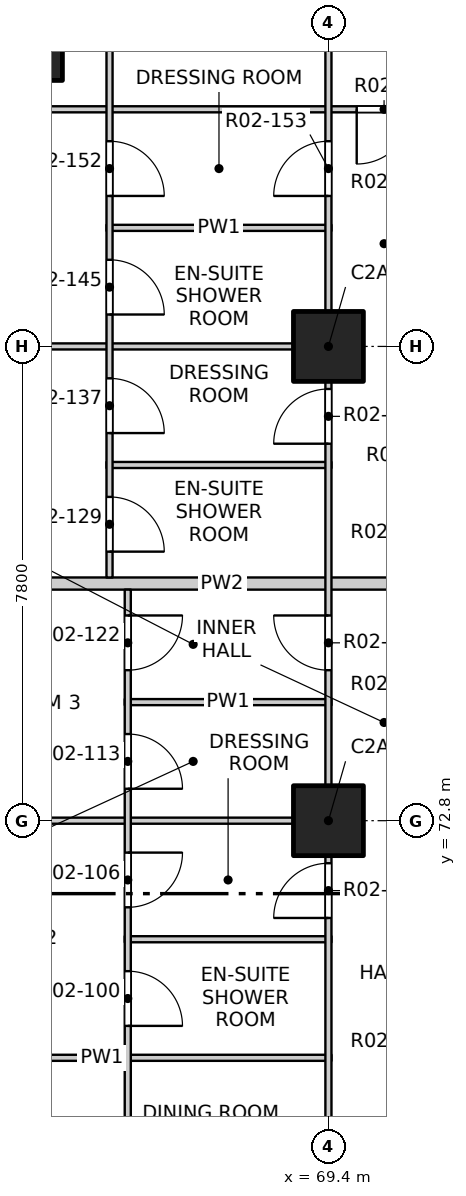
"""IFC4 building model, lengths in metres.
Left out: names, types, materials, properties, quantities, classifications, styles, units other than length and angle.
Written with IfcOpenShell. Run it as: python <this file> out.ifc"""

import sys

from ifc_helpers import new_model, si_unit, direction, frame, frame_2d, origin, origin_2d, place, context, subcontext, project, spatial, rectangle, extrude, element, fill, save


model = new_model("IFC4")
c1 = context("Model", 3, precision=1e-05, world=origin(), true_north=direction((0.0, 1.0)))
c2 = subcontext(c1, "Body", "Model", "MODEL_VIEW")
j1 = project(units=[si_unit("LENGTHUNIT", "METRE"), si_unit("PLANEANGLEUNIT", "RADIAN")], contexts=[c1])
p1 = place(None, origin())
s1 = spatial("IfcSite", under=j1, at=p1, CompositionType="ELEMENT")
p2 = place(p1, origin())
s2 = spatial("IfcBuilding", under=s1, at=p2, CompositionType="ELEMENT")
p3 = place(p2, frame((0.0, 0.0, 29.7)))
s3 = spatial("IfcBuildingStorey", under=s2, at=p3, CompositionType="ELEMENT", Elevation=29.7)
p4 = place(p3, frame((64.5, 85.5, -0.25), z_axis=(0.0, 0.0, 1.0), x_axis=(1.0, 0.0, 0.0)))
e1 = element("IfcColumn", 1, at=p4, inside=s3, PredefinedType="COLUMN", context=c2, shape_type="SweptSolid", body=[
    extrude(rectangle(XDim=1.05, YDim=1.05, at=origin_2d()), origin(), (0.0, 0.0, 1.0), 3.4),
])
for number, where, z_axis, x_axis in (
    (2, (69.4, 72.8, -0.25), (0.0, 0.0, 1.0), (1.0, 0.0, 0.0)),
    (3, (69.4, 80.6, -0.25), (0.0, 0.0, 1.0), (1.0, 0.0, 0.0)),
):
    element("IfcColumn", number, at=place(p3, frame(where, z_axis=z_axis, x_axis=x_axis)), inside=s3, PredefinedType="COLUMN", context=c2, shape_type="SweptSolid", body=[
        extrude(rectangle(XDim=1.15, YDim=1.15, at=origin_2d()), origin(), (0.0, 0.0, 1.0), 3.4),
    ])
p5 = place(p3, frame((61.9, 68.9, 0.0), z_axis=(0.0, 0.0, 1.0), x_axis=(1.0, 0.0, 0.0)))
e4 = element("IfcWall", 4, at=p5, inside=s3, PredefinedType="PARTITIONING", context=c2, shape_type="SweptSolid", body=[
    extrude(rectangle(XDim=7.55, YDim=0.1, at=frame_2d((3.775, 0.0))), origin(), (0.0, 0.0, 1.0), 3.15),
])
p6 = place(p3, frame((66.05, 70.85, 0.0), z_axis=(0.0, 0.0, 1.0), x_axis=(1.0, 0.0, 0.0)))
e5 = element("IfcWall", 5, at=p6, inside=s3, PredefinedType="PARTITIONING", context=c2, shape_type="SweptSolid", body=[
    extrude(rectangle(XDim=3.4, YDim=0.1, at=frame_2d((1.7, 0.0))), origin(), (0.0, 0.0, 1.0), 3.15),
])
p7 = place(p3, frame((61.9, 72.8, 0.0), z_axis=(0.0, 0.0, 1.0), x_axis=(1.0, 0.0, 0.0)))
e6 = element("IfcWall", 6, at=p7, inside=s3, PredefinedType="PARTITIONING", context=c2, shape_type="SweptSolid", body=[
    extrude(rectangle(XDim=7.55, YDim=0.1, at=frame_2d((3.775, 0.0))), origin(), (0.0, 0.0, 1.0), 2.55),
])
p8 = place(p3, frame((66.05, 74.75, 0.0), z_axis=(0.0, 0.0, 1.0), x_axis=(1.0, 0.0, 0.0)))
e7 = element("IfcWall", 7, at=p8, inside=s3, PredefinedType="PARTITIONING", context=c2, shape_type="SweptSolid", body=[
    extrude(rectangle(XDim=3.4, YDim=0.1, at=frame_2d((1.7, 0.0))), origin(), (0.0, 0.0, 1.0), 3.15),
])
p9 = place(p3, frame((61.9, 76.7, 0.0), z_axis=(0.0, 0.0, 1.0), x_axis=(1.0, 0.0, 0.0)))
e8 = element("IfcWall", 8, at=p9, inside=s3, PredefinedType="PARTITIONING", context=c2, shape_type="SweptSolid", body=[
    extrude(rectangle(XDim=11.5, YDim=0.2, at=frame_2d((5.75, 0.0))), origin(), (0.0, 0.0, 1.0), 3.15),
])
p10 = place(p3, frame((65.75, 78.65, 0.0), z_axis=(0.0, 0.0, 1.0), x_axis=(1.0, 0.0, 0.0)))
e9 = element("IfcWall", 9, at=p10, inside=s3, PredefinedType="PARTITIONING", context=c2, shape_type="SweptSolid", body=[
    extrude(rectangle(XDim=3.7, YDim=0.1, at=frame_2d((1.85, 0.0))), origin(), (0.0, 0.0, 1.0), 3.15),
])
p11 = place(p3, frame((61.9, 80.6, 0.0), z_axis=(0.0, 0.0, 1.0), x_axis=(1.0, 0.0, 0.0)))
e10 = element("IfcWall", 10, at=p11, inside=s3, PredefinedType="PARTITIONING", context=c2, shape_type="SweptSolid", body=[
    extrude(rectangle(XDim=7.55, YDim=0.1, at=frame_2d((3.775, 0.0))), origin(), (0.0, 0.0, 1.0), 2.55),
])
p12 = place(p3, frame((65.75, 82.55, 0.0), z_axis=(0.0, 0.0, 1.0), x_axis=(1.0, 0.0, 0.0)))
e11 = element("IfcWall", 11, at=p12, inside=s3, PredefinedType="PARTITIONING", context=c2, shape_type="SweptSolid", body=[
    extrude(rectangle(XDim=3.7, YDim=0.1, at=frame_2d((1.85, 0.0))), origin(), (0.0, 0.0, 1.0), 3.15),
])
p13 = place(p3, frame((61.9, 84.5, 0.0), z_axis=(0.0, 0.0, 1.0), x_axis=(1.0, 0.0, 0.0)))
e12 = element("IfcWall", 12, at=p13, inside=s3, PredefinedType="PARTITIONING", context=c2, shape_type="SweptSolid", body=[
    extrude(rectangle(XDim=11.5, YDim=0.1, at=frame_2d((5.75, 0.0))), origin(), (0.0, 0.0, 1.0), 3.15),
])
p14 = place(p13, frame((7.965, 0.0, 0.0)))
e13 = element("IfcOpeningElement", 13, at=p14, cuts=e12, PredefinedType="OPENING", context=c2, shape_type="SweptSolid", body=[
    extrude(rectangle(XDim=0.9, YDim=2.1, at=frame_2d((0.45, 1.05))), frame((0.0, 0.06, 0.0), z_axis=(0.0, -1.0, 0.0), x_axis=(1.0, 0.0, 0.0)), (0.0, 0.0, 1.0), 0.12),
])
p15 = place(p3, frame((65.8, 76.8, 0.0), z_axis=(0.0, 0.0, 1.0), x_axis=(0.0, 1.0, 0.0)))
e14 = element("IfcWall", 14, at=p15, inside=s3, PredefinedType="PARTITIONING", context=c2, shape_type="SweptSolid", body=[
    extrude(rectangle(XDim=11.3, YDim=0.1, at=frame_2d((5.65, 0.0))), origin(), (0.0, 0.0, 1.0), 3.15),
])
p16 = place(p15, frame((0.425, 0.0, 0.0)))
e15 = element("IfcOpeningElement", 15, at=p16, cuts=e14, PredefinedType="OPENING", context=c2, shape_type="SweptSolid", body=[
    extrude(rectangle(XDim=0.9, YDim=2.1, at=frame_2d((0.45, 1.05))), frame((0.0, 0.06, 0.0), z_axis=(0.0, -1.0, 0.0), x_axis=(1.0, 0.0, 0.0)), (0.0, 0.0, 1.0), 0.12),
])
p17 = place(p15, frame((2.375, 0.0, 0.0)))
e16 = element("IfcOpeningElement", 16, at=p17, cuts=e14, PredefinedType="OPENING", context=c2, shape_type="SweptSolid", body=[
    extrude(rectangle(XDim=0.9, YDim=2.1, at=frame_2d((0.45, 1.05))), frame((0.0, 0.06, 0.0), z_axis=(0.0, -1.0, 0.0), x_axis=(1.0, 0.0, 0.0)), (0.0, 0.0, 1.0), 0.12),
])
p18 = place(p15, frame((4.325, 0.0, 0.0)))
e17 = element("IfcOpeningElement", 17, at=p18, cuts=e14, PredefinedType="OPENING", context=c2, shape_type="SweptSolid", body=[
    extrude(rectangle(XDim=0.9, YDim=2.1, at=frame_2d((0.45, 1.05))), frame((0.0, 0.06, 0.0), z_axis=(0.0, -1.0, 0.0), x_axis=(1.0, 0.0, 0.0)), (0.0, 0.0, 1.0), 0.12),
])
p19 = place(p15, frame((6.275, 0.0, 0.0)))
e18 = element("IfcOpeningElement", 18, at=p19, cuts=e14, PredefinedType="OPENING", context=c2, shape_type="SweptSolid", body=[
    extrude(rectangle(XDim=0.9, YDim=2.1, at=frame_2d((0.45, 1.05))), frame((0.0, 0.06, 0.0), z_axis=(0.0, -1.0, 0.0), x_axis=(1.0, 0.0, 0.0)), (0.0, 0.0, 1.0), 0.12),
])
p20 = place(p15, frame((9.05, 0.0, 0.0)))
e19 = element("IfcOpeningElement", 19, at=p20, cuts=e14, PredefinedType="OPENING", context=c2, shape_type="SweptSolid", body=[
    extrude(rectangle(XDim=1.2, YDim=2.1, at=frame_2d((0.6, 1.05))), frame((0.0, 0.06, 0.0), z_axis=(0.0, -1.0, 0.0), x_axis=(1.0, 0.0, 0.0)), (0.0, 0.0, 1.0), 0.12),
])
p21 = place(p3, frame((66.1, 41.9, 0.0), z_axis=(0.0, 0.0, 1.0), x_axis=(0.0, 1.0, 0.0)))
e20 = element("IfcWall", 20, at=p21, inside=s3, PredefinedType="PARTITIONING", context=c2, shape_type="SweptSolid", body=[
    extrude(rectangle(XDim=34.7, YDim=0.1, at=frame_2d((17.35, 0.0))), origin(), (0.0, 0.0, 1.0), 3.15),
])
p22 = place(p21, frame((1.05, 0.0, 0.0)))
e21 = element("IfcOpeningElement", 21, at=p22, cuts=e20, PredefinedType="OPENING", context=c2, shape_type="SweptSolid", body=[
    extrude(rectangle(XDim=1.2, YDim=2.1, at=frame_2d((0.6, 1.05))), frame((0.0, 0.06, 0.0), z_axis=(0.0, -1.0, 0.0), x_axis=(1.0, 0.0, 0.0)), (0.0, 0.0, 1.0), 0.12),
])
p23 = place(p21, frame((4.95, 0.0, 0.0)))
e22 = element("IfcOpeningElement", 22, at=p23, cuts=e20, PredefinedType="OPENING", context=c2, shape_type="SweptSolid", body=[
    extrude(rectangle(XDim=1.2, YDim=2.1, at=frame_2d((0.6, 1.05))), frame((0.0, 0.06, 0.0), z_axis=(0.0, -1.0, 0.0), x_axis=(1.0, 0.0, 0.0)), (0.0, 0.0, 1.0), 0.12),
])
p24 = place(p21, frame((8.025, 0.0, 0.0)))
e23 = element("IfcOpeningElement", 23, at=p24, cuts=e20, PredefinedType="OPENING", context=c2, shape_type="SweptSolid", body=[
    extrude(rectangle(XDim=0.9, YDim=2.1, at=frame_2d((0.45, 1.05))), frame((0.0, 0.06, 0.0), z_axis=(0.0, -1.0, 0.0), x_axis=(1.0, 0.0, 0.0)), (0.0, 0.0, 1.0), 0.12),
])
p25 = place(p21, frame((9.975, 0.0, 0.0)))
e24 = element("IfcOpeningElement", 24, at=p25, cuts=e20, PredefinedType="OPENING", context=c2, shape_type="SweptSolid", body=[
    extrude(rectangle(XDim=0.9, YDim=2.1, at=frame_2d((0.45, 1.05))), frame((0.0, 0.06, 0.0), z_axis=(0.0, -1.0, 0.0), x_axis=(1.0, 0.0, 0.0)), (0.0, 0.0, 1.0), 0.12),
])
p26 = place(p21, frame((12.75, 0.0, 0.0)))
e25 = element("IfcOpeningElement", 25, at=p26, cuts=e20, PredefinedType="OPENING", context=c2, shape_type="SweptSolid", body=[
    extrude(rectangle(XDim=1.2, YDim=2.1, at=frame_2d((0.6, 1.05))), frame((0.0, 0.06, 0.0), z_axis=(0.0, -1.0, 0.0), x_axis=(1.0, 0.0, 0.0)), (0.0, 0.0, 1.0), 0.12),
])
p27 = place(p21, frame((15.825, 0.0, 0.0)))
e26 = element("IfcOpeningElement", 26, at=p27, cuts=e20, PredefinedType="OPENING", context=c2, shape_type="SweptSolid", body=[
    extrude(rectangle(XDim=0.9, YDim=2.1, at=frame_2d((0.45, 1.05))), frame((0.0, 0.06, 0.0), z_axis=(0.0, -1.0, 0.0), x_axis=(1.0, 0.0, 0.0)), (0.0, 0.0, 1.0), 0.12),
])
p28 = place(p21, frame((17.775, 0.0, 0.0)))
e27 = element("IfcOpeningElement", 27, at=p28, cuts=e20, PredefinedType="OPENING", context=c2, shape_type="SweptSolid", body=[
    extrude(rectangle(XDim=0.9, YDim=2.1, at=frame_2d((0.45, 1.05))), frame((0.0, 0.06, 0.0), z_axis=(0.0, -1.0, 0.0), x_axis=(1.0, 0.0, 0.0)), (0.0, 0.0, 1.0), 0.12),
])
p29 = place(p21, frame((19.725, 0.0, 0.0)))
e28 = element("IfcOpeningElement", 28, at=p29, cuts=e20, PredefinedType="OPENING", context=c2, shape_type="SweptSolid", body=[
    extrude(rectangle(XDim=0.9, YDim=2.1, at=frame_2d((0.45, 1.05))), frame((0.0, 0.06, 0.0), z_axis=(0.0, -1.0, 0.0), x_axis=(1.0, 0.0, 0.0)), (0.0, 0.0, 1.0), 0.12),
])
p30 = place(p21, frame((21.675, 0.0, 0.0)))
e29 = element("IfcOpeningElement", 29, at=p30, cuts=e20, PredefinedType="OPENING", context=c2, shape_type="SweptSolid", body=[
    extrude(rectangle(XDim=0.9, YDim=2.1, at=frame_2d((0.45, 1.05))), frame((0.0, 0.06, 0.0), z_axis=(0.0, -1.0, 0.0), x_axis=(1.0, 0.0, 0.0)), (0.0, 0.0, 1.0), 0.12),
])
p31 = place(p21, frame((24.45, 0.0, 0.0)))
e30 = element("IfcOpeningElement", 30, at=p31, cuts=e20, PredefinedType="OPENING", context=c2, shape_type="SweptSolid", body=[
    extrude(rectangle(XDim=1.2, YDim=2.1, at=frame_2d((0.6, 1.05))), frame((0.0, 0.06, 0.0), z_axis=(0.0, -1.0, 0.0), x_axis=(1.0, 0.0, 0.0)), (0.0, 0.0, 1.0), 0.12),
])
p32 = place(p21, frame((27.525, 0.0, 0.0)))
e31 = element("IfcOpeningElement", 31, at=p32, cuts=e20, PredefinedType="OPENING", context=c2, shape_type="SweptSolid", body=[
    extrude(rectangle(XDim=0.9, YDim=2.1, at=frame_2d((0.45, 1.05))), frame((0.0, 0.06, 0.0), z_axis=(0.0, -1.0, 0.0), x_axis=(1.0, 0.0, 0.0)), (0.0, 0.0, 1.0), 0.12),
])
p33 = place(p21, frame((29.475, 0.0, 0.0)))
e32 = element("IfcOpeningElement", 32, at=p33, cuts=e20, PredefinedType="OPENING", context=c2, shape_type="SweptSolid", body=[
    extrude(rectangle(XDim=0.9, YDim=2.1, at=frame_2d((0.45, 1.05))), frame((0.0, 0.06, 0.0), z_axis=(0.0, -1.0, 0.0), x_axis=(1.0, 0.0, 0.0)), (0.0, 0.0, 1.0), 0.12),
])
p34 = place(p21, frame((31.425, 0.0, 0.0)))
e33 = element("IfcOpeningElement", 33, at=p34, cuts=e20, PredefinedType="OPENING", context=c2, shape_type="SweptSolid", body=[
    extrude(rectangle(XDim=0.9, YDim=2.1, at=frame_2d((0.45, 1.05))), frame((0.0, 0.06, 0.0), z_axis=(0.0, -1.0, 0.0), x_axis=(1.0, 0.0, 0.0)), (0.0, 0.0, 1.0), 0.12),
])
p35 = place(p21, frame((33.375, 0.0, 0.0)))
e34 = element("IfcOpeningElement", 34, at=p35, cuts=e20, PredefinedType="OPENING", context=c2, shape_type="SweptSolid", body=[
    extrude(rectangle(XDim=0.9, YDim=2.1, at=frame_2d((0.45, 1.05))), frame((0.0, 0.06, 0.0), z_axis=(0.0, -1.0, 0.0), x_axis=(1.0, 0.0, 0.0)), (0.0, 0.0, 1.0), 0.12),
])
p36 = place(p3, frame((69.4, 49.4, 0.0), z_axis=(0.0, 0.0, 1.0), x_axis=(0.0, 1.0, 0.0)))
e35 = element("IfcWall", 35, at=p36, inside=s3, PredefinedType="PARTITIONING", context=c2, shape_type="SweptSolid", body=[
    extrude(rectangle(XDim=31.2, YDim=0.1, at=frame_2d((15.6, 0.0))), origin(), (0.0, 0.0, 1.0), 3.15),
])
p37 = place(p36, frame((2.475, 0.0, 0.0)))
e36 = element("IfcOpeningElement", 36, at=p37, cuts=e35, PredefinedType="OPENING", context=c2, shape_type="SweptSolid", body=[
    extrude(rectangle(XDim=0.9, YDim=2.1, at=frame_2d((0.45, 1.05))), frame((0.0, 0.06, 0.0), z_axis=(0.0, -1.0, 0.0), x_axis=(1.0, 0.0, 0.0)), (0.0, 0.0, 1.0), 0.12),
])
p38 = place(p36, frame((5.4, 0.0, 0.0)))
e37 = element("IfcOpeningElement", 37, at=p38, cuts=e35, PredefinedType="OPENING", context=c2, shape_type="SweptSolid", body=[
    extrude(rectangle(XDim=0.9, YDim=2.1, at=frame_2d((0.45, 1.05))), frame((0.0, 0.06, 0.0), z_axis=(0.0, -1.0, 0.0), x_axis=(1.0, 0.0, 0.0)), (0.0, 0.0, 1.0), 0.12),
])
p39 = place(p36, frame((10.275, 0.0, 0.0)))
e38 = element("IfcOpeningElement", 38, at=p39, cuts=e35, PredefinedType="OPENING", context=c2, shape_type="SweptSolid", body=[
    extrude(rectangle(XDim=0.9, YDim=2.1, at=frame_2d((0.45, 1.05))), frame((0.0, 0.06, 0.0), z_axis=(0.0, -1.0, 0.0), x_axis=(1.0, 0.0, 0.0)), (0.0, 0.0, 1.0), 0.12),
])
p40 = place(p36, frame((14.0, 0.0, 0.0)))
e39 = element("IfcOpeningElement", 39, at=p40, cuts=e35, PredefinedType="OPENING", context=c2, shape_type="SweptSolid", body=[
    extrude(rectangle(XDim=0.9, YDim=2.1, at=frame_2d((0.45, 1.05))), frame((0.0, 0.06, 0.0), z_axis=(0.0, -1.0, 0.0), x_axis=(1.0, 0.0, 0.0)), (0.0, 0.0, 1.0), 0.12),
])
p41 = place(p36, frame((17.1, 0.0, 0.0)))
e40 = element("IfcOpeningElement", 40, at=p41, cuts=e35, PredefinedType="OPENING", context=c2, shape_type="SweptSolid", body=[
    extrude(rectangle(XDim=0.9, YDim=2.1, at=frame_2d((0.45, 1.05))), frame((0.0, 0.06, 0.0), z_axis=(0.0, -1.0, 0.0), x_axis=(1.0, 0.0, 0.0)), (0.0, 0.0, 1.0), 0.12),
])
p42 = place(p36, frame((21.8, 0.0, 0.0)))
e41 = element("IfcOpeningElement", 41, at=p42, cuts=e35, PredefinedType="OPENING", context=c2, shape_type="SweptSolid", body=[
    extrude(rectangle(XDim=0.9, YDim=2.1, at=frame_2d((0.45, 1.05))), frame((0.0, 0.06, 0.0), z_axis=(0.0, -1.0, 0.0), x_axis=(1.0, 0.0, 0.0)), (0.0, 0.0, 1.0), 0.12),
])
p43 = place(p36, frame((25.875, 0.0, 0.0)))
e42 = element("IfcOpeningElement", 42, at=p43, cuts=e35, PredefinedType="OPENING", context=c2, shape_type="SweptSolid", body=[
    extrude(rectangle(XDim=0.9, YDim=2.1, at=frame_2d((0.45, 1.05))), frame((0.0, 0.06, 0.0), z_axis=(0.0, -1.0, 0.0), x_axis=(1.0, 0.0, 0.0)), (0.0, 0.0, 1.0), 0.12),
])
p44 = place(p36, frame((29.6, 0.0, 0.0)))
e43 = element("IfcOpeningElement", 43, at=p44, cuts=e35, PredefinedType="OPENING", context=c2, shape_type="SweptSolid", body=[
    extrude(rectangle(XDim=0.9, YDim=2.1, at=frame_2d((0.45, 1.05))), frame((0.0, 0.06, 0.0), z_axis=(0.0, -1.0, 0.0), x_axis=(1.0, 0.0, 0.0)), (0.0, 0.0, 1.0), 0.12),
])
p45 = place(p3, frame((69.4, 80.6, 0.0), z_axis=(0.0, 0.0, 1.0), x_axis=(0.0, 1.0, 0.0)))
e44 = element("IfcWall", 44, at=p45, inside=s3, PredefinedType="PARTITIONING", context=c2, shape_type="SweptSolid", body=[
    extrude(rectangle(XDim=7.5, YDim=0.1, at=frame_2d((3.75, 0.0))), origin(), (0.0, 0.0, 1.0), 2.55),
])
p46 = place(p45, frame((2.475, 0.0, 0.0)))
e45 = element("IfcOpeningElement", 45, at=p46, cuts=e44, PredefinedType="OPENING", context=c2, shape_type="SweptSolid", body=[
    extrude(rectangle(XDim=0.9, YDim=2.1, at=frame_2d((0.45, 1.05))), frame((0.0, 0.06, 0.0), z_axis=(0.0, -1.0, 0.0), x_axis=(1.0, 0.0, 0.0)), (0.0, 0.0, 1.0), 0.12),
])
p47 = place(p45, frame((5.4, 0.0, 0.0)))
e46 = element("IfcOpeningElement", 46, at=p47, cuts=e44, PredefinedType="OPENING", context=c2, shape_type="SweptSolid", body=[
    extrude(rectangle(XDim=0.9, YDim=2.1, at=frame_2d((0.45, 1.05))), frame((0.0, 0.06, 0.0), z_axis=(0.0, -1.0, 0.0), x_axis=(1.0, 0.0, 0.0)), (0.0, 0.0, 1.0), 0.12),
])
p48 = place(p32, origin())
e47 = element("IfcDoor", 47, at=p48, inside=s3, OperationType="SINGLE_SWING_RIGHT", PredefinedType="DOOR", context=c2, shape_type="SweptSolid", body=[
    extrude(rectangle(XDim=0.9, YDim=2.1, at=frame_2d((0.45, 1.05))), frame((0.0, 0.025, 0.0), z_axis=(0.0, -1.0, 0.0), x_axis=(1.0, 0.0, 0.0)), (0.0, 0.0, 1.0), 0.05),
])
fill(e31, e47)
p49 = place(p42, origin())
e48 = element("IfcDoor", 48, at=p49, inside=s3, OperationType="SINGLE_SWING_LEFT", PredefinedType="DOOR", context=c2, shape_type="SweptSolid", body=[
    extrude(rectangle(XDim=0.9, YDim=2.1, at=frame_2d((0.45, 1.05))), frame((0.0, 0.025, 0.0), z_axis=(0.0, -1.0, 0.0), x_axis=(1.0, 0.0, 0.0)), (0.0, 0.0, 1.0), 0.05),
])
fill(e41, e48)
p50 = place(p33, origin())
e49 = element("IfcDoor", 49, at=p50, inside=s3, OperationType="SINGLE_SWING_LEFT", PredefinedType="DOOR", context=c2, shape_type="SweptSolid", body=[
    extrude(rectangle(XDim=0.9, YDim=2.1, at=frame_2d((0.45, 1.05))), frame((0.0, 0.025, 0.0), z_axis=(0.0, -1.0, 0.0), x_axis=(1.0, 0.0, 0.0)), (0.0, 0.0, 1.0), 0.05),
])
fill(e32, e49)
p51 = place(p34, origin())
e50 = element("IfcDoor", 50, at=p51, inside=s3, OperationType="SINGLE_SWING_RIGHT", PredefinedType="DOOR", context=c2, shape_type="SweptSolid", body=[
    extrude(rectangle(XDim=0.9, YDim=2.1, at=frame_2d((0.45, 1.05))), frame((0.0, 0.025, 0.0), z_axis=(0.0, -1.0, 0.0), x_axis=(1.0, 0.0, 0.0)), (0.0, 0.0, 1.0), 0.05),
])
fill(e33, e50)
p52 = place(p35, origin())
e51 = element("IfcDoor", 51, at=p52, inside=s3, OperationType="SINGLE_SWING_LEFT", PredefinedType="DOOR", context=c2, shape_type="SweptSolid", body=[
    extrude(rectangle(XDim=0.9, YDim=2.1, at=frame_2d((0.45, 1.05))), frame((0.0, 0.025, 0.0), z_axis=(0.0, -1.0, 0.0), x_axis=(1.0, 0.0, 0.0)), (0.0, 0.0, 1.0), 0.05),
])
fill(e34, e51)
p53 = place(p43, origin())
e52 = element("IfcDoor", 52, at=p53, inside=s3, OperationType="SINGLE_SWING_RIGHT", PredefinedType="DOOR", context=c2, shape_type="SweptSolid", body=[
    extrude(rectangle(XDim=0.9, YDim=2.1, at=frame_2d((0.45, 1.05))), frame((0.0, 0.025, 0.0), z_axis=(0.0, -1.0, 0.0), x_axis=(1.0, 0.0, 0.0)), (0.0, 0.0, 1.0), 0.05),
])
fill(e42, e52)
p54 = place(p16, origin())
e53 = element("IfcDoor", 53, at=p54, inside=s3, OperationType="SINGLE_SWING_RIGHT", PredefinedType="DOOR", context=c2, shape_type="SweptSolid", body=[
    extrude(rectangle(XDim=0.9, YDim=2.1, at=frame_2d((0.45, 1.05))), frame((0.0, 0.025, 0.0), z_axis=(0.0, -1.0, 0.0), x_axis=(1.0, 0.0, 0.0)), (0.0, 0.0, 1.0), 0.05),
])
fill(e15, e53)
p55 = place(p44, origin())
e54 = element("IfcDoor", 54, at=p55, inside=s3, OperationType="SINGLE_SWING_LEFT", PredefinedType="DOOR", context=c2, shape_type="SweptSolid", body=[
    extrude(rectangle(XDim=0.9, YDim=2.1, at=frame_2d((0.45, 1.05))), frame((0.0, 0.025, 0.0), z_axis=(0.0, -1.0, 0.0), x_axis=(1.0, 0.0, 0.0)), (0.0, 0.0, 1.0), 0.05),
])
fill(e43, e54)
p56 = place(p17, origin())
e55 = element("IfcDoor", 55, at=p56, inside=s3, OperationType="SINGLE_SWING_RIGHT", PredefinedType="DOOR", context=c2, shape_type="SweptSolid", body=[
    extrude(rectangle(XDim=0.9, YDim=2.1, at=frame_2d((0.45, 1.05))), frame((0.0, 0.025, 0.0), z_axis=(0.0, -1.0, 0.0), x_axis=(1.0, 0.0, 0.0)), (0.0, 0.0, 1.0), 0.05),
])
fill(e16, e55)
p57 = place(p18, origin())
e56 = element("IfcDoor", 56, at=p57, inside=s3, OperationType="SINGLE_SWING_RIGHT", PredefinedType="DOOR", context=c2, shape_type="SweptSolid", body=[
    extrude(rectangle(XDim=0.9, YDim=2.1, at=frame_2d((0.45, 1.05))), frame((0.0, 0.025, 0.0), z_axis=(0.0, -1.0, 0.0), x_axis=(1.0, 0.0, 0.0)), (0.0, 0.0, 1.0), 0.05),
])
fill(e17, e56)
p58 = place(p19, origin())
e57 = element("IfcDoor", 57, at=p58, inside=s3, OperationType="SINGLE_SWING_RIGHT", PredefinedType="DOOR", context=c2, shape_type="SweptSolid", body=[
    extrude(rectangle(XDim=0.9, YDim=2.1, at=frame_2d((0.45, 1.05))), frame((0.0, 0.025, 0.0), z_axis=(0.0, -1.0, 0.0), x_axis=(1.0, 0.0, 0.0)), (0.0, 0.0, 1.0), 0.05),
])
fill(e18, e57)
p59 = place(p46, origin())
e58 = element("IfcDoor", 58, at=p59, inside=s3, OperationType="SINGLE_SWING_LEFT", PredefinedType="DOOR", context=c2, shape_type="SweptSolid", body=[
    extrude(rectangle(XDim=0.9, YDim=2.1, at=frame_2d((0.45, 1.05))), frame((0.0, 0.025, 0.0), z_axis=(0.0, -1.0, 0.0), x_axis=(1.0, 0.0, 0.0)), (0.0, 0.0, 1.0), 0.05),
])
fill(e45, e58)
p60 = place(p14, origin())
e59 = element("IfcDoor", 59, at=p60, inside=s3, OperationType="SINGLE_SWING_RIGHT", PredefinedType="DOOR", context=c2, shape_type="SweptSolid", body=[
    extrude(rectangle(XDim=0.9, YDim=2.1, at=frame_2d((0.45, 1.05))), frame((0.0, 0.025, 0.0), z_axis=(0.0, -1.0, 0.0), x_axis=(1.0, 0.0, 0.0)), (0.0, 0.0, 1.0), 0.05),
])
fill(e13, e59)
save(model, sys.argv[1])
